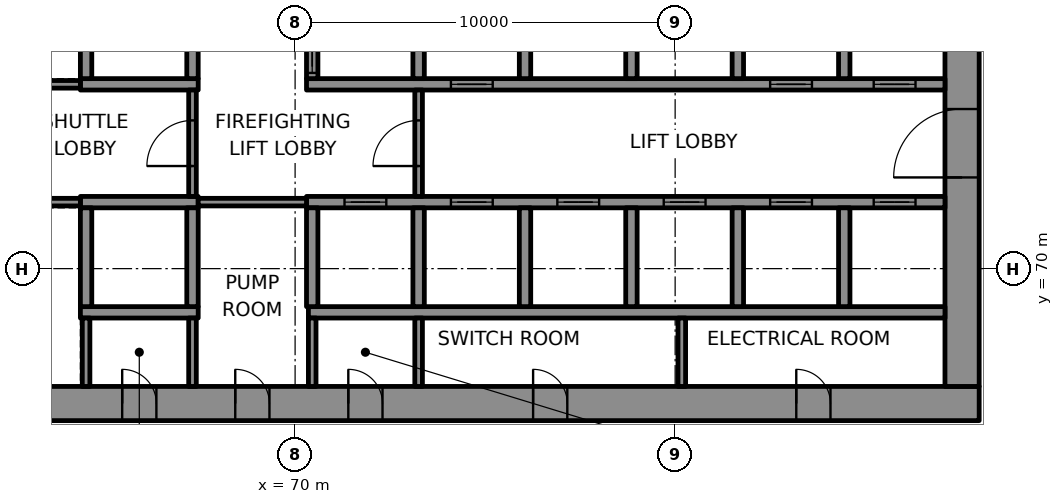
"""IFC4 building model, lengths in metres.
Left out: names, types, materials, properties, quantities, classifications, styles, units other than length and angle.
Written with IfcOpenShell. Run it as: python <this file> out.ifc"""

import sys

from ifc_helpers import new_model, si_unit, direction, frame, frame_2d, origin, place, context, subcontext, project, spatial, rectangle, extrude, element, fill, save


model = new_model("IFC4")
c1 = context("Model", 3, precision=1e-05, world=origin(), true_north=direction((0.0, 1.0)))
c2 = subcontext(c1, "Body", "Model", "MODEL_VIEW")
j1 = project(units=[si_unit("LENGTHUNIT", "METRE"), si_unit("PLANEANGLEUNIT", "RADIAN")], contexts=[c1])
p1 = place(None, origin())
s1 = spatial("IfcSite", under=j1, at=p1, CompositionType="ELEMENT")
p2 = place(p1, origin())
s2 = spatial("IfcBuilding", under=s1, at=p2, CompositionType="ELEMENT")
p3 = place(p2, frame((0.0, 0.0, 119.8)))
s3 = spatial("IfcBuildingStorey", under=s2, at=p3, CompositionType="ELEMENT", Elevation=119.8)
p4 = place(p3, frame((62.0, 66.45, 0.0), z_axis=(0.0, 0.0, 1.0), x_axis=(1.0, 0.0, 0.0)))
e1 = element("IfcWall", 1, at=p4, inside=s3, PredefinedType="SHEAR", context=c2, shape_type="SweptSolid", body=[
    extrude(rectangle(XDim=26.0, YDim=0.9, at=frame_2d((13.0, 0.0))), origin(), (0.0, 0.0, 1.0), 4.0),
])
p5 = place(p4, frame((3.45, 0.0, 0.0)))
e2 = element("IfcOpeningElement", 2, at=p5, cuts=e1, PredefinedType="OPENING", context=c2, shape_type="SweptSolid", body=[
    extrude(rectangle(XDim=0.9, YDim=2.1, at=frame_2d((0.45, 1.05))), frame((0.0, 0.46, 0.0), z_axis=(0.0, -1.0, 0.0), x_axis=(1.0, 0.0, 0.0)), (0.0, 0.0, 1.0), 0.92),
])
p6 = place(p4, frame((6.425, 0.0, 0.0)))
e3 = element("IfcOpeningElement", 3, at=p6, cuts=e1, PredefinedType="OPENING", context=c2, shape_type="SweptSolid", body=[
    extrude(rectangle(XDim=0.9, YDim=2.1, at=frame_2d((0.45, 1.05))), frame((0.0, 0.46, 0.0), z_axis=(0.0, -1.0, 0.0), x_axis=(1.0, 0.0, 0.0)), (0.0, 0.0, 1.0), 0.92),
])
p7 = place(p4, frame((9.4, 0.0, 0.0)))
e4 = element("IfcOpeningElement", 4, at=p7, cuts=e1, PredefinedType="OPENING", context=c2, shape_type="SweptSolid", body=[
    extrude(rectangle(XDim=0.9, YDim=2.1, at=frame_2d((0.45, 1.05))), frame((0.0, 0.46, 0.0), z_axis=(0.0, -1.0, 0.0), x_axis=(1.0, 0.0, 0.0)), (0.0, 0.0, 1.0), 0.92),
])
p8 = place(p4, frame((14.262, 0.0, 0.0)))
e5 = element("IfcOpeningElement", 5, at=p8, cuts=e1, PredefinedType="OPENING", context=c2, shape_type="SweptSolid", body=[
    extrude(rectangle(XDim=0.9, YDim=2.1, at=frame_2d((0.45, 1.05))), frame((0.0, 0.46, 0.0), z_axis=(0.0, -1.0, 0.0), x_axis=(1.0, 0.0, 0.0)), (0.0, 0.0, 1.0), 0.92),
])
p9 = place(p4, frame((21.188, 0.0, 0.0)))
e6 = element("IfcOpeningElement", 6, at=p9, cuts=e1, PredefinedType="OPENING", context=c2, shape_type="SweptSolid", body=[
    extrude(rectangle(XDim=0.9, YDim=2.1, at=frame_2d((0.45, 1.05))), frame((0.0, 0.46, 0.0), z_axis=(0.0, -1.0, 0.0), x_axis=(1.0, 0.0, 0.0)), (0.0, 0.0, 1.0), 0.92),
])
p10 = place(p3, frame((87.55, 66.9, 0.0), z_axis=(0.0, 0.0, 1.0), x_axis=(0.0, 1.0, 0.0)))
e7 = element("IfcWall", 7, at=p10, inside=s3, PredefinedType="SHEAR", context=c2, shape_type="SweptSolid", body=[
    extrude(rectangle(XDim=16.2, YDim=0.9, at=frame_2d((8.1, 0.0))), origin(), (0.0, 0.0, 1.0), 4.0),
])
p11 = place(p10, frame((5.5, 0.0, 0.0)))
e8 = element("IfcOpeningElement", 8, at=p11, cuts=e7, PredefinedType="OPENING", context=c2, shape_type="SweptSolid", body=[
    extrude(rectangle(XDim=1.8, YDim=2.1, at=frame_2d((0.9, 1.05))), frame((0.0, 0.46, 0.0), z_axis=(0.0, -1.0, 0.0), x_axis=(1.0, 0.0, 0.0)), (0.0, 0.0, 1.0), 0.92),
])
p12 = place(p10, frame((11.738, 0.0, 0.0)))
e9 = element("IfcOpeningElement", 9, at=p12, cuts=e7, PredefinedType="OPENING", context=c2, shape_type="SweptSolid", body=[
    extrude(rectangle(XDim=0.9, YDim=2.1, at=frame_2d((0.45, 1.05))), frame((0.0, 0.46, 0.0), z_axis=(0.0, -1.0, 0.0), x_axis=(1.0, 0.0, 0.0)), (0.0, 0.0, 1.0), 0.92),
])
p13 = place(p3, frame((64.35, 68.85, 0.0), z_axis=(0.0, 0.0, 1.0), x_axis=(1.0, 0.0, 0.0)))
e10 = element("IfcWall", 10, at=p13, inside=s3, PredefinedType="SHEAR", context=c2, shape_type="SweptSolid", body=[
    extrude(rectangle(XDim=3.1, YDim=0.3, at=frame_2d((1.55, 0.0))), origin(), (0.0, 0.0, 1.0), 4.0),
])
p14 = place(p3, frame((70.35, 68.85, 0.0), z_axis=(0.0, 0.0, 1.0), x_axis=(1.0, 0.0, 0.0)))
e11 = element("IfcWall", 11, at=p14, inside=s3, PredefinedType="SHEAR", context=c2, shape_type="SweptSolid", body=[
    extrude(rectangle(XDim=16.75, YDim=0.3, at=frame_2d((8.375, 0.0))), origin(), (0.0, 0.0, 1.0), 4.0),
])
p15 = place(p3, frame((64.35, 71.75, 0.0), z_axis=(0.0, 0.0, 1.0), x_axis=(1.0, 0.0, 0.0)))
e12 = element("IfcWall", 12, at=p15, inside=s3, PredefinedType="SHEAR", context=c2, shape_type="SweptSolid", body=[
    extrude(rectangle(XDim=3.1, YDim=0.3, at=frame_2d((1.55, 0.0))), origin(), (0.0, 0.0, 1.0), 4.0),
])
p16 = place(p3, frame((70.3, 71.75, 0.0), z_axis=(0.0, 0.0, 1.0), x_axis=(1.0, 0.0, 0.0)))
e13 = element("IfcWall", 13, at=p16, inside=s3, PredefinedType="SHEAR", context=c2, shape_type="SweptSolid", body=[
    extrude(rectangle(XDim=16.8, YDim=0.3, at=frame_2d((8.4, 0.0))), origin(), (0.0, 0.0, 1.0), 4.0),
])
p17 = place(p16, frame((1.0, 0.0, 0.0)))
e14 = element("IfcOpeningElement", 14, at=p17, cuts=e13, PredefinedType="OPENING", context=c2, shape_type="SweptSolid", body=[
    extrude(rectangle(XDim=1.1, YDim=2.1, at=frame_2d((0.55, 1.05))), frame((0.0, 0.16, 0.0), z_axis=(0.0, -1.0, 0.0), x_axis=(1.0, 0.0, 0.0)), (0.0, 0.0, 1.0), 0.32),
])
p18 = place(p16, frame((3.8, 0.0, 0.0)))
e15 = element("IfcOpeningElement", 15, at=p18, cuts=e13, PredefinedType="OPENING", context=c2, shape_type="SweptSolid", body=[
    extrude(rectangle(XDim=1.1, YDim=2.1, at=frame_2d((0.55, 1.05))), frame((0.0, 0.16, 0.0), z_axis=(0.0, -1.0, 0.0), x_axis=(1.0, 0.0, 0.0)), (0.0, 0.0, 1.0), 0.32),
])
p19 = place(p16, frame((6.6, 0.0, 0.0)))
e16 = element("IfcOpeningElement", 16, at=p19, cuts=e13, PredefinedType="OPENING", context=c2, shape_type="SweptSolid", body=[
    extrude(rectangle(XDim=1.1, YDim=2.1, at=frame_2d((0.55, 1.05))), frame((0.0, 0.16, 0.0), z_axis=(0.0, -1.0, 0.0), x_axis=(1.0, 0.0, 0.0)), (0.0, 0.0, 1.0), 0.32),
])
p20 = place(p16, frame((9.4, 0.0, 0.0)))
e17 = element("IfcOpeningElement", 17, at=p20, cuts=e13, PredefinedType="OPENING", context=c2, shape_type="SweptSolid", body=[
    extrude(rectangle(XDim=1.1, YDim=2.1, at=frame_2d((0.55, 1.05))), frame((0.0, 0.16, 0.0), z_axis=(0.0, -1.0, 0.0), x_axis=(1.0, 0.0, 0.0)), (0.0, 0.0, 1.0), 0.32),
])
p21 = place(p16, frame((12.2, 0.0, 0.0)))
e18 = element("IfcOpeningElement", 18, at=p21, cuts=e13, PredefinedType="OPENING", context=c2, shape_type="SweptSolid", body=[
    extrude(rectangle(XDim=1.1, YDim=2.1, at=frame_2d((0.55, 1.05))), frame((0.0, 0.16, 0.0), z_axis=(0.0, -1.0, 0.0), x_axis=(1.0, 0.0, 0.0)), (0.0, 0.0, 1.0), 0.32),
])
p22 = place(p16, frame((14.925, 0.0, 0.0)))
e19 = element("IfcOpeningElement", 19, at=p22, cuts=e13, PredefinedType="OPENING", context=c2, shape_type="SweptSolid", body=[
    extrude(rectangle(XDim=1.1, YDim=2.1, at=frame_2d((0.55, 1.05))), frame((0.0, 0.16, 0.0), z_axis=(0.0, -1.0, 0.0), x_axis=(1.0, 0.0, 0.0)), (0.0, 0.0, 1.0), 0.32),
])
p23 = place(p3, frame((64.35, 74.85, 0.0), z_axis=(0.0, 0.0, 1.0), x_axis=(1.0, 0.0, 0.0)))
e20 = element("IfcWall", 20, at=p23, inside=s3, PredefinedType="SHEAR", context=c2, shape_type="SweptSolid", body=[
    extrude(rectangle(XDim=3.1, YDim=0.3, at=frame_2d((1.55, 0.0))), origin(), (0.0, 0.0, 1.0), 4.0),
])
p24 = place(p3, frame((70.3, 74.85, 0.0), z_axis=(0.0, 0.0, 1.0), x_axis=(1.0, 0.0, 0.0)))
e21 = element("IfcWall", 21, at=p24, inside=s3, PredefinedType="SHEAR", context=c2, shape_type="SweptSolid", body=[
    extrude(rectangle(XDim=16.8, YDim=0.3, at=frame_2d((8.4, 0.0))), origin(), (0.0, 0.0, 1.0), 4.0),
])
p25 = place(p24, frame((3.8, 0.0, 0.0)))
e22 = element("IfcOpeningElement", 22, at=p25, cuts=e21, PredefinedType="OPENING", context=c2, shape_type="SweptSolid", body=[
    extrude(rectangle(XDim=1.1, YDim=2.1, at=frame_2d((0.55, 1.05))), frame((0.0, 0.16, 0.0), z_axis=(0.0, -1.0, 0.0), x_axis=(1.0, 0.0, 0.0)), (0.0, 0.0, 1.0), 0.32),
])
p26 = place(p24, frame((12.2, 0.0, 0.0)))
e23 = element("IfcOpeningElement", 23, at=p26, cuts=e21, PredefinedType="OPENING", context=c2, shape_type="SweptSolid", body=[
    extrude(rectangle(XDim=1.1, YDim=2.1, at=frame_2d((0.55, 1.05))), frame((0.0, 0.16, 0.0), z_axis=(0.0, -1.0, 0.0), x_axis=(1.0, 0.0, 0.0)), (0.0, 0.0, 1.0), 0.32),
])
p27 = place(p24, frame((14.925, 0.0, 0.0)))
e24 = element("IfcOpeningElement", 24, at=p27, cuts=e21, PredefinedType="OPENING", context=c2, shape_type="SweptSolid", body=[
    extrude(rectangle(XDim=1.1, YDim=2.1, at=frame_2d((0.55, 1.05))), frame((0.0, 0.16, 0.0), z_axis=(0.0, -1.0, 0.0), x_axis=(1.0, 0.0, 0.0)), (0.0, 0.0, 1.0), 0.32),
])
for number, where, z_axis, x_axis in (
    (25, (64.5, 69.0, 0.0), (0.0, 0.0, 1.0), (0.0, 1.0, 0.0)),
    (26, (64.5, 75.0, 0.0), (0.0, 0.0, 1.0), (0.0, 1.0, 0.0)),
    (27, (67.3, 69.0, 0.0), (0.0, 0.0, 1.0), (0.0, 1.0, 0.0)),
    (28, (67.3, 75.0, 0.0), (0.0, 0.0, 1.0), (0.0, 1.0, 0.0)),
    (29, (70.45, 69.0, 0.0), (0.0, 0.0, 1.0), (0.0, 1.0, 0.0)),
):
    element("IfcWall", number, at=place(p3, frame(where, z_axis=z_axis, x_axis=x_axis)), inside=s3, PredefinedType="SHEAR", context=c2, shape_type="SweptSolid", body=[
        extrude(rectangle(XDim=2.6, YDim=0.3, at=frame_2d((1.3, 0.0))), origin(), (0.0, 0.0, 1.0), 4.0),
    ])
p28 = place(p3, frame((70.45, 75.0, 0.0), z_axis=(0.0, 0.0, 1.0), x_axis=(0.0, 1.0, 0.0)))
e30 = element("IfcWall", 30, at=p28, inside=s3, PredefinedType="SHEAR", context=c2, shape_type="SweptSolid", body=[
    extrude(rectangle(XDim=2.6, YDim=0.3, at=frame_2d((1.3, 0.0))), origin(), (0.0, 0.0, 1.0), 4.0),
])
p29 = place(p28, frame((0.15, 0.0, 0.0)))
e31 = element("IfcOpeningElement", 31, at=p29, cuts=e30, PredefinedType="OPENING", context=c2, shape_type="SweptSolid", body=[
    extrude(rectangle(XDim=1.1, YDim=2.1, at=frame_2d((0.55, 1.05))), frame((0.0, 0.16, 0.0), z_axis=(0.0, -1.0, 0.0), x_axis=(1.0, 0.0, 0.0)), (0.0, 0.0, 1.0), 0.32),
])
for number, where, z_axis, x_axis in (
    (32, (73.25, 69.0, 0.0), (0.0, 0.0, 1.0), (0.0, 1.0, 0.0)),
    (33, (73.25, 75.0, 0.0), (0.0, 0.0, 1.0), (0.0, 1.0, 0.0)),
    (34, (76.05, 69.0, 0.0), (0.0, 0.0, 1.0), (0.0, 1.0, 0.0)),
    (35, (76.05, 75.0, 0.0), (0.0, 0.0, 1.0), (0.0, 1.0, 0.0)),
    (36, (78.85, 69.0, 0.0), (0.0, 0.0, 1.0), (0.0, 1.0, 0.0)),
    (37, (78.85, 75.0, 0.0), (0.0, 0.0, 1.0), (0.0, 1.0, 0.0)),
    (38, (81.65, 69.0, 0.0), (0.0, 0.0, 1.0), (0.0, 1.0, 0.0)),
    (39, (81.65, 75.0, 0.0), (0.0, 0.0, 1.0), (0.0, 1.0, 0.0)),
    (40, (84.45, 69.0, 0.0), (0.0, 0.0, 1.0), (0.0, 1.0, 0.0)),
    (41, (84.45, 75.0, 0.0), (0.0, 0.0, 1.0), (0.0, 1.0, 0.0)),
):
    element("IfcWall", number, at=place(p3, frame(where, z_axis=z_axis, x_axis=x_axis)), inside=s3, PredefinedType="SHEAR", context=c2, shape_type="SweptSolid", body=[
        extrude(rectangle(XDim=2.6, YDim=0.3, at=frame_2d((1.3, 0.0))), origin(), (0.0, 0.0, 1.0), 4.0),
    ])
p30 = place(p3, frame((69.117, 112.258, 0.0), z_axis=(0.0, 0.0, 1.0), x_axis=(-0.500000992643, -0.866024830681, 0.0)))
e42 = element("IfcWall", 42, at=p30, inside=s3, PredefinedType="SOLIDWALL", context=c2, shape_type="SweptSolid", body=[
    extrude(rectangle(XDim=58.649, YDim=0.8, at=frame_2d((29.325, 0.0))), origin(), (0.0, 0.0, 1.0), 0.9),
])
p31 = place(p3, frame((62.9, 71.75, 0.0), z_axis=(0.0, 0.0, 1.0), x_axis=(1.0, 0.0, 0.0)))
e43 = element("IfcWall", 43, at=p31, inside=s3, PredefinedType="PARTITIONING", context=c2, shape_type="SweptSolid", body=[
    extrude(rectangle(XDim=1.45, YDim=0.2, at=frame_2d((0.725, 0.0))), origin(), (0.0, 0.0, 1.0), 4.0),
])
p32 = place(p3, frame((67.45, 71.75, 0.0), z_axis=(0.0, 0.0, 1.0), x_axis=(1.0, 0.0, 0.0)))
e44 = element("IfcWall", 44, at=p32, inside=s3, PredefinedType="PARTITIONING", context=c2, shape_type="SweptSolid", body=[
    extrude(rectangle(XDim=2.85, YDim=0.2, at=frame_2d((1.425, 0.0))), origin(), (0.0, 0.0, 1.0), 4.0),
])
p33 = place(p3, frame((62.9, 74.85, 0.0), z_axis=(0.0, 0.0, 1.0), x_axis=(1.0, 0.0, 0.0)))
e45 = element("IfcWall", 45, at=p33, inside=s3, PredefinedType="PARTITIONING", context=c2, shape_type="SweptSolid", body=[
    extrude(rectangle(XDim=1.45, YDim=0.2, at=frame_2d((0.725, 0.0))), origin(), (0.0, 0.0, 1.0), 4.0),
])
for number, where, z_axis, x_axis in (
    (46, (64.5, 66.9, 0.0), (0.0, 0.0, 1.0), (0.0, 1.0, 0.0)),
    (47, (67.3, 66.9, 0.0), (0.0, 0.0, 1.0), (0.0, 1.0, 0.0)),
):
    element("IfcWall", number, at=place(p3, frame(where, z_axis=z_axis, x_axis=x_axis)), inside=s3, PredefinedType="PARTITIONING", context=c2, shape_type="SweptSolid", body=[
        extrude(rectangle(XDim=1.8, YDim=0.2, at=frame_2d((0.9, 0.0))), origin(), (0.0, 0.0, 1.0), 4.0),
    ])
p34 = place(p3, frame((67.3, 71.9, 0.0), z_axis=(0.0, 0.0, 1.0), x_axis=(0.0, 1.0, 0.0)))
e48 = element("IfcWall", 48, at=p34, inside=s3, PredefinedType="PARTITIONING", context=c2, shape_type="SweptSolid", body=[
    extrude(rectangle(XDim=2.8, YDim=0.2, at=frame_2d((1.4, 0.0))), origin(), (0.0, 0.0, 1.0), 4.0),
])
p35 = place(p34, frame((0.8, 0.0, 0.0)))
e49 = element("IfcOpeningElement", 49, at=p35, cuts=e48, PredefinedType="OPENING", context=c2, shape_type="SweptSolid", body=[
    extrude(rectangle(XDim=1.2, YDim=2.1, at=frame_2d((0.6, 1.05))), frame((0.0, 0.11, 0.0), z_axis=(0.0, -1.0, 0.0), x_axis=(1.0, 0.0, 0.0)), (0.0, 0.0, 1.0), 0.22),
])
for number, where, z_axis, x_axis in (
    (50, (70.45, 66.9, 0.0), (0.0, 0.0, 1.0), (0.0, 1.0, 0.0)),
    (51, (73.25, 66.9, 0.0), (0.0, 0.0, 1.0), (0.0, 1.0, 0.0)),
):
    element("IfcWall", number, at=place(p3, frame(where, z_axis=z_axis, x_axis=x_axis)), inside=s3, PredefinedType="PARTITIONING", context=c2, shape_type="SweptSolid", body=[
        extrude(rectangle(XDim=1.8, YDim=0.2, at=frame_2d((0.9, 0.0))), origin(), (0.0, 0.0, 1.0), 4.0),
    ])
p36 = place(p3, frame((73.25, 71.9, 0.0), z_axis=(0.0, 0.0, 1.0), x_axis=(0.0, 1.0, 0.0)))
e52 = element("IfcWall", 52, at=p36, inside=s3, PredefinedType="PARTITIONING", context=c2, shape_type="SweptSolid", body=[
    extrude(rectangle(XDim=2.8, YDim=0.2, at=frame_2d((1.4, 0.0))), origin(), (0.0, 0.0, 1.0), 4.0),
])
p37 = place(p36, frame((0.8, 0.0, 0.0)))
e53 = element("IfcOpeningElement", 53, at=p37, cuts=e52, PredefinedType="OPENING", context=c2, shape_type="SweptSolid", body=[
    extrude(rectangle(XDim=1.2, YDim=2.1, at=frame_2d((0.6, 1.05))), frame((0.0, 0.11, 0.0), z_axis=(0.0, -1.0, 0.0), x_axis=(1.0, 0.0, 0.0)), (0.0, 0.0, 1.0), 0.22),
])
p38 = place(p3, frame((80.175, 66.9, 0.0), z_axis=(0.0, 0.0, 1.0), x_axis=(0.0, 1.0, 0.0)))
e54 = element("IfcWall", 54, at=p38, inside=s3, PredefinedType="PARTITIONING", context=c2, shape_type="SweptSolid", body=[
    extrude(rectangle(XDim=1.8, YDim=0.2, at=frame_2d((0.9, 0.0))), origin(), (0.0, 0.0, 1.0), 4.0),
])
p39 = place(p17, origin())
e55 = element("IfcDoor", 55, at=p39, inside=s3, OperationType="DOUBLE_DOOR_SLIDING", PredefinedType="DOOR", context=c2, shape_type="SweptSolid", body=[
    extrude(rectangle(XDim=1.1, YDim=2.1, at=frame_2d((0.55, 1.05))), frame((0.0, 0.025, 0.0), z_axis=(0.0, -1.0, 0.0), x_axis=(1.0, 0.0, 0.0)), (0.0, 0.0, 1.0), 0.05),
])
fill(e14, e55)
p40 = place(p18, origin())
e56 = element("IfcDoor", 56, at=p40, inside=s3, OperationType="DOUBLE_DOOR_SLIDING", PredefinedType="DOOR", context=c2, shape_type="SweptSolid", body=[
    extrude(rectangle(XDim=1.1, YDim=2.1, at=frame_2d((0.55, 1.05))), frame((0.0, 0.025, 0.0), z_axis=(0.0, -1.0, 0.0), x_axis=(1.0, 0.0, 0.0)), (0.0, 0.0, 1.0), 0.05),
])
fill(e15, e56)
p41 = place(p19, origin())
e57 = element("IfcDoor", 57, at=p41, inside=s3, OperationType="DOUBLE_DOOR_SLIDING", PredefinedType="DOOR", context=c2, shape_type="SweptSolid", body=[
    extrude(rectangle(XDim=1.1, YDim=2.1, at=frame_2d((0.55, 1.05))), frame((0.0, 0.025, 0.0), z_axis=(0.0, -1.0, 0.0), x_axis=(1.0, 0.0, 0.0)), (0.0, 0.0, 1.0), 0.05),
])
fill(e16, e57)
p42 = place(p20, origin())
e58 = element("IfcDoor", 58, at=p42, inside=s3, OperationType="DOUBLE_DOOR_SLIDING", PredefinedType="DOOR", context=c2, shape_type="SweptSolid", body=[
    extrude(rectangle(XDim=1.1, YDim=2.1, at=frame_2d((0.55, 1.05))), frame((0.0, 0.025, 0.0), z_axis=(0.0, -1.0, 0.0), x_axis=(1.0, 0.0, 0.0)), (0.0, 0.0, 1.0), 0.05),
])
fill(e17, e58)
p43 = place(p21, origin())
e59 = element("IfcDoor", 59, at=p43, inside=s3, OperationType="DOUBLE_DOOR_SLIDING", PredefinedType="DOOR", context=c2, shape_type="SweptSolid", body=[
    extrude(rectangle(XDim=1.1, YDim=2.1, at=frame_2d((0.55, 1.05))), frame((0.0, 0.025, 0.0), z_axis=(0.0, -1.0, 0.0), x_axis=(1.0, 0.0, 0.0)), (0.0, 0.0, 1.0), 0.05),
])
fill(e18, e59)
p44 = place(p22, origin())
e60 = element("IfcDoor", 60, at=p44, inside=s3, OperationType="DOUBLE_DOOR_SLIDING", PredefinedType="DOOR", context=c2, shape_type="SweptSolid", body=[
    extrude(rectangle(XDim=1.1, YDim=2.1, at=frame_2d((0.55, 1.05))), frame((0.0, 0.025, 0.0), z_axis=(0.0, -1.0, 0.0), x_axis=(1.0, 0.0, 0.0)), (0.0, 0.0, 1.0), 0.05),
])
fill(e19, e60)
p45 = place(p29, origin())
e61 = element("IfcDoor", 61, at=p45, inside=s3, OperationType="DOUBLE_DOOR_SLIDING", PredefinedType="DOOR", context=c2, shape_type="SweptSolid", body=[
    extrude(rectangle(XDim=1.1, YDim=2.1, at=frame_2d((0.55, 1.05))), frame((0.0, 0.025, 0.0), z_axis=(0.0, -1.0, 0.0), x_axis=(1.0, 0.0, 0.0)), (0.0, 0.0, 1.0), 0.05),
])
fill(e31, e61)
p46 = place(p25, origin())
e62 = element("IfcDoor", 62, at=p46, inside=s3, OperationType="DOUBLE_DOOR_SLIDING", PredefinedType="DOOR", context=c2, shape_type="SweptSolid", body=[
    extrude(rectangle(XDim=1.1, YDim=2.1, at=frame_2d((0.55, 1.05))), frame((0.0, 0.025, 0.0), z_axis=(0.0, -1.0, 0.0), x_axis=(1.0, 0.0, 0.0)), (0.0, 0.0, 1.0), 0.05),
])
fill(e22, e62)
p47 = place(p26, origin())
e63 = element("IfcDoor", 63, at=p47, inside=s3, OperationType="DOUBLE_DOOR_SLIDING", PredefinedType="DOOR", context=c2, shape_type="SweptSolid", body=[
    extrude(rectangle(XDim=1.1, YDim=2.1, at=frame_2d((0.55, 1.05))), frame((0.0, 0.025, 0.0), z_axis=(0.0, -1.0, 0.0), x_axis=(1.0, 0.0, 0.0)), (0.0, 0.0, 1.0), 0.05),
])
fill(e23, e63)
p48 = place(p27, origin())
e64 = element("IfcDoor", 64, at=p48, inside=s3, OperationType="DOUBLE_DOOR_SLIDING", PredefinedType="DOOR", context=c2, shape_type="SweptSolid", body=[
    extrude(rectangle(XDim=1.1, YDim=2.1, at=frame_2d((0.55, 1.05))), frame((0.0, 0.025, 0.0), z_axis=(0.0, -1.0, 0.0), x_axis=(1.0, 0.0, 0.0)), (0.0, 0.0, 1.0), 0.05),
])
fill(e24, e64)
p49 = place(p37, origin())
e65 = element("IfcDoor", 65, at=p49, inside=s3, OperationType="SINGLE_SWING_LEFT", PredefinedType="DOOR", context=c2, shape_type="SweptSolid", body=[
    extrude(rectangle(XDim=1.2, YDim=2.1, at=frame_2d((0.6, 1.05))), frame((0.0, 0.025, 0.0), z_axis=(0.0, -1.0, 0.0), x_axis=(1.0, 0.0, 0.0)), (0.0, 0.0, 1.0), 0.05),
])
fill(e53, e65)
p50 = place(p35, origin())
e66 = element("IfcDoor", 66, at=p50, inside=s3, OperationType="SINGLE_SWING_RIGHT", PredefinedType="DOOR", context=c2, shape_type="SweptSolid", body=[
    extrude(rectangle(XDim=1.2, YDim=2.1, at=frame_2d((0.6, 1.05))), frame((0.0, 0.025, 0.0), z_axis=(0.0, -1.0, 0.0), x_axis=(1.0, 0.0, 0.0)), (0.0, 0.0, 1.0), 0.05),
])
fill(e49, e66)
p51 = place(p11, origin())
e67 = element("IfcDoor", 67, at=p51, inside=s3, OperationType="SINGLE_SWING_RIGHT", PredefinedType="DOOR", context=c2, shape_type="SweptSolid", body=[
    extrude(rectangle(XDim=1.8, YDim=2.1, at=frame_2d((0.9, 1.05))), frame((0.0, 0.17, 0.0), z_axis=(0.0, -1.0, 0.0), x_axis=(1.0, 0.0, 0.0)), (0.0, 0.0, 1.0), 0.34),
])
fill(e8, e67)
p52 = place(p5, origin())
e68 = element("IfcDoor", 68, at=p52, inside=s3, OperationType="SINGLE_SWING_LEFT", PredefinedType="DOOR", context=c2, shape_type="SweptSolid", body=[
    extrude(rectangle(XDim=0.9, YDim=2.1, at=frame_2d((0.45, 1.05))), frame((0.0, 0.17, 0.0), z_axis=(0.0, -1.0, 0.0), x_axis=(1.0, 0.0, 0.0)), (0.0, 0.0, 1.0), 0.34),
])
fill(e2, e68)
p53 = place(p6, origin())
e69 = element("IfcDoor", 69, at=p53, inside=s3, OperationType="SINGLE_SWING_RIGHT", PredefinedType="DOOR", context=c2, shape_type="SweptSolid", body=[
    extrude(rectangle(XDim=0.9, YDim=2.1, at=frame_2d((0.45, 1.05))), frame((0.0, 0.17, 0.0), z_axis=(0.0, -1.0, 0.0), x_axis=(1.0, 0.0, 0.0)), (0.0, 0.0, 1.0), 0.34),
])
fill(e3, e69)
p54 = place(p7, origin())
e70 = element("IfcDoor", 70, at=p54, inside=s3, OperationType="SINGLE_SWING_LEFT", PredefinedType="DOOR", context=c2, shape_type="SweptSolid", body=[
    extrude(rectangle(XDim=0.9, YDim=2.1, at=frame_2d((0.45, 1.05))), frame((0.0, 0.17, 0.0), z_axis=(0.0, -1.0, 0.0), x_axis=(1.0, 0.0, 0.0)), (0.0, 0.0, 1.0), 0.34),
])
fill(e4, e70)
p55 = place(p8, origin())
e71 = element("IfcDoor", 71, at=p55, inside=s3, OperationType="SINGLE_SWING_RIGHT", PredefinedType="DOOR", context=c2, shape_type="SweptSolid", body=[
    extrude(rectangle(XDim=0.9, YDim=2.1, at=frame_2d((0.45, 1.05))), frame((0.0, 0.17, 0.0), z_axis=(0.0, -1.0, 0.0), x_axis=(1.0, 0.0, 0.0)), (0.0, 0.0, 1.0), 0.34),
])
fill(e5, e71)
p56 = place(p9, origin())
e72 = element("IfcDoor", 72, at=p56, inside=s3, OperationType="SINGLE_SWING_LEFT", PredefinedType="DOOR", context=c2, shape_type="SweptSolid", body=[
    extrude(rectangle(XDim=0.9, YDim=2.1, at=frame_2d((0.45, 1.05))), frame((0.0, 0.17, 0.0), z_axis=(0.0, -1.0, 0.0), x_axis=(1.0, 0.0, 0.0)), (0.0, 0.0, 1.0), 0.34),
])
fill(e6, e72)
save(model, sys.argv[1])
